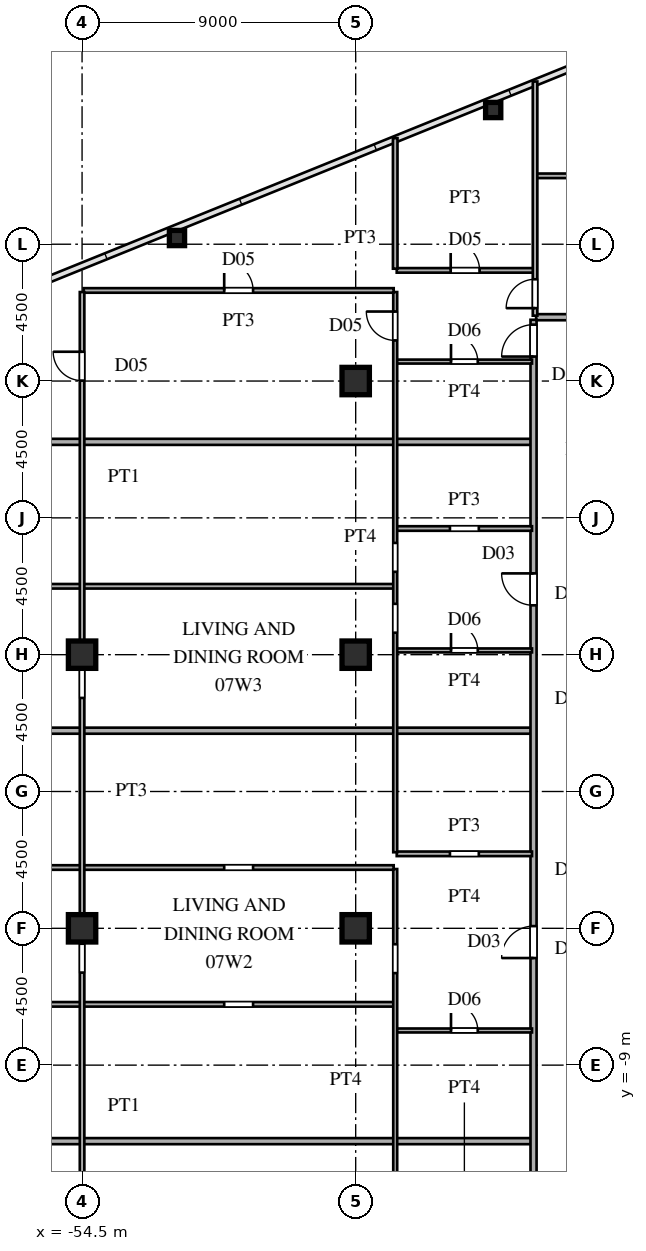
"""IFC4 building model, lengths in metres.
Left out: names, types, materials, properties, quantities, classifications, styles, units other than length and angle.
Written with IfcOpenShell. Run it as: python <this file> out.ifc"""

import sys

from ifc_helpers import new_model, si_unit, direction, frame, frame_2d, origin, origin_2d, place, context, subcontext, project, spatial, rectangle, hollow_rectangle, i_section, extrude, source, transform, mapped, element, fill, save


model = new_model("IFC4")
c1 = context("Model", 3, precision=1e-05, world=origin(), true_north=direction((0.0, 1.0)))
c2 = subcontext(c1, "Body", "Model", "MODEL_VIEW")
j1 = project(units=[si_unit("LENGTHUNIT", "METRE"), si_unit("PLANEANGLEUNIT", "RADIAN")], contexts=[c1])
p1 = place(None, origin())
s1 = spatial("IfcSite", under=j1, at=p1, CompositionType="ELEMENT")
p2 = place(p1, origin())
s2 = spatial("IfcBuilding", under=s1, at=p2, CompositionType="ELEMENT")
p3 = place(p2, frame((0.0, 0.0, 29.7)))
s3 = spatial("IfcBuildingStorey", under=s2, at=p3, CompositionType="ELEMENT", Elevation=29.7)
m1 = source(origin(), c2, "Body", "SweptSolid", [
    extrude(i_section(OverallWidth=0.9, OverallDepth=0.9, WebThickness=0.036, FlangeThickness=0.055, at=origin_2d()), origin(), (0.0, 0.0, 1.0), 3.6),
])
for number, where, z_axis, x_axis in (
    (1, (-45.5, -4.5, 0.0), (0.0, 0.0, 1.0), (1.0, 0.0, 0.0)),
    (2, (-45.5, 4.5, 0.0), (0.0, 0.0, 1.0), (1.0, 0.0, 0.0)),
    (3, (-45.5, 13.5, 0.0), (0.0, 0.0, 1.0), (1.0, 0.0, 0.0)),
    (4, (-54.5, -4.5, 0.0), (0.0, 0.0, 1.0), (1.0, 0.0, 0.0)),
    (5, (-54.5, 4.5, 0.0), (0.0, 0.0, 1.0), (1.0, 0.0, 0.0)),
):
    element("IfcColumn", number, at=place(p3, frame(where, z_axis=z_axis, x_axis=x_axis)), inside=s3, PredefinedType="COLUMN", context=c2, shape_type="MappedRepresentation", body=[
        mapped(m1, transform((0.0, 0.0, 0.0), scale=1.0)),
    ])
m2 = source(origin(), c2, "Body", "SweptSolid", [
    extrude(hollow_rectangle(XDim=0.5, YDim=0.5, WallThickness=0.02, at=origin_2d()), origin(), (0.0, 0.0, 1.0), 3.6),
])
for number, where, z_axis, x_axis in (
    (6, (-40.977, 22.414, 0.0), (0.0, 0.0, 1.0), (1.0, 0.0, 0.0)),
    (7, (-51.378, 18.204, 0.0), (0.0, 0.0, 1.0), (1.0, 0.0, 0.0)),
):
    element("IfcColumn", number, at=place(p3, frame(where, z_axis=z_axis, x_axis=x_axis)), inside=s3, PredefinedType="COLUMN", context=c2, shape_type="MappedRepresentation", body=[
        mapped(m2, transform((0.0, 0.0, 0.0), scale=1.0)),
    ])
p4 = place(p3, frame((-68.807, -11.5, 0.0), z_axis=(0.0, 0.0, 1.0), x_axis=(1.0, 0.0, 0.0)))
e8 = element("IfcWall", 8, at=p4, inside=s3, PredefinedType="PARTITIONING", context=c2, shape_type="SweptSolid", body=[
    extrude(rectangle(XDim=29.077, YDim=0.2, at=frame_2d((14.539, 0.0))), origin(), (0.0, 0.0, 1.0), 3.38),
])
p5 = place(p3, frame((-44.15, -7.86, 0.0), z_axis=(0.0, 0.0, 1.0), x_axis=(1.0, 0.0, 0.0)))
e9 = element("IfcWall", 9, at=p5, inside=s3, PredefinedType="PARTITIONING", context=c2, shape_type="SweptSolid", body=[
    extrude(rectangle(XDim=4.45, YDim=0.13, at=frame_2d((2.225, 0.0))), origin(), (0.0, 0.0, 1.0), 3.38),
])
p6 = place(p5, frame((1.785, 0.0, 0.0)))
e10 = element("IfcOpeningElement", 10, at=p6, cuts=e9, PredefinedType="OPENING", context=c2, shape_type="SweptSolid", body=[
    extrude(rectangle(XDim=0.88, YDim=2.1, at=frame_2d((0.44, 1.05))), frame((0.0, 0.075, 0.0), z_axis=(0.0, -1.0, 0.0), x_axis=(1.0, 0.0, 0.0)), (0.0, 0.0, 1.0), 0.15),
])
p7 = place(p3, frame((-72.535, -7.0, 0.0), z_axis=(0.0, 0.0, 1.0), x_axis=(1.0, 0.0, 0.0)))
e11 = element("IfcWall", 11, at=p7, inside=s3, PredefinedType="PARTITIONING", context=c2, shape_type="SweptSolid", body=[
    extrude(rectangle(XDim=28.285, YDim=0.15, at=frame_2d((14.143, 0.0))), origin(), (0.0, 0.0, 1.0), 3.38),
])
p8 = place(p7, frame((22.71, 0.0, 0.0)))
e12 = element("IfcOpeningElement", 12, at=p8, cuts=e11, PredefinedType="OPENING", context=c2, shape_type="SweptSolid", body=[
    extrude(rectangle(XDim=0.95, YDim=2.15, at=frame_2d((0.475, 1.075))), frame((0.0, 0.085, 0.0), z_axis=(0.0, -1.0, 0.0), x_axis=(1.0, 0.0, 0.0)), (0.0, 0.0, 1.0), 0.17),
])
p9 = place(p7, frame((14.71, 0.0, 0.0)))
e13 = element("IfcOpeningElement", 13, at=p9, cuts=e11, PredefinedType="OPENING", context=c2, shape_type="SweptSolid", body=[
    extrude(rectangle(XDim=0.95, YDim=2.15, at=frame_2d((0.475, 1.075))), frame((0.0, 0.085, 0.0), z_axis=(0.0, -1.0, 0.0), x_axis=(1.0, 0.0, 0.0)), (0.0, 0.0, 1.0), 0.17),
])
p10 = place(p3, frame((-72.535, -2.5, 0.0), z_axis=(0.0, 0.0, 1.0), x_axis=(1.0, 0.0, 0.0)))
e14 = element("IfcWall", 14, at=p10, inside=s3, PredefinedType="PARTITIONING", context=c2, shape_type="SweptSolid", body=[
    extrude(rectangle(XDim=28.285, YDim=0.15, at=frame_2d((14.143, 0.0))), origin(), (0.0, 0.0, 1.0), 3.38),
])
p11 = place(p10, frame((22.71, 0.0, 0.0)))
e15 = element("IfcOpeningElement", 15, at=p11, cuts=e14, PredefinedType="OPENING", context=c2, shape_type="SweptSolid", body=[
    extrude(rectangle(XDim=0.95, YDim=2.15, at=frame_2d((0.475, 1.075))), frame((0.0, 0.085, 0.0), z_axis=(0.0, -1.0, 0.0), x_axis=(1.0, 0.0, 0.0)), (0.0, 0.0, 1.0), 0.17),
])
p12 = place(p10, frame((14.71, 0.0, 0.0)))
e16 = element("IfcOpeningElement", 16, at=p12, cuts=e14, PredefinedType="OPENING", context=c2, shape_type="SweptSolid", body=[
    extrude(rectangle(XDim=0.95, YDim=2.15, at=frame_2d((0.475, 1.075))), frame((0.0, 0.085, 0.0), z_axis=(0.0, -1.0, 0.0), x_axis=(1.0, 0.0, 0.0)), (0.0, 0.0, 1.0), 0.17),
])
p13 = place(p3, frame((-44.15, -2.05, 0.0), z_axis=(0.0, 0.0, 1.0), x_axis=(1.0, 0.0, 0.0)))
e17 = element("IfcWall", 17, at=p13, inside=s3, PredefinedType="PARTITIONING", context=c2, shape_type="SweptSolid", body=[
    extrude(rectangle(XDim=4.45, YDim=0.15, at=frame_2d((2.225, 0.0))), origin(), (0.0, 0.0, 1.0), 3.38),
])
p14 = place(p13, frame((1.75, 0.0, 0.0)))
e18 = element("IfcOpeningElement", 18, at=p14, cuts=e17, PredefinedType="OPENING", context=c2, shape_type="SweptSolid", body=[
    extrude(rectangle(XDim=0.95, YDim=2.15, at=frame_2d((0.475, 1.075))), frame((0.0, 0.085, 0.0), z_axis=(0.0, -1.0, 0.0), x_axis=(1.0, 0.0, 0.0)), (0.0, 0.0, 1.0), 0.17),
])
p15 = place(p3, frame((-72.505, 2.0, 0.0), z_axis=(0.0, 0.0, 1.0), x_axis=(1.0, 0.0, 0.0)))
e19 = element("IfcWall", 19, at=p15, inside=s3, PredefinedType="PARTITIONING", context=c2, shape_type="SweptSolid", body=[
    extrude(rectangle(XDim=32.775, YDim=0.2, at=frame_2d((16.387, 0.0))), origin(), (0.0, 0.0, 1.0), 3.38),
])
p16 = place(p3, frame((-44.15, 4.64, 0.0), z_axis=(0.0, 0.0, 1.0), x_axis=(1.0, 0.0, 0.0)))
e20 = element("IfcWall", 20, at=p16, inside=s3, PredefinedType="PARTITIONING", context=c2, shape_type="SweptSolid", body=[
    extrude(rectangle(XDim=4.45, YDim=0.13, at=frame_2d((2.225, 0.0))), origin(), (0.0, 0.0, 1.0), 2.68),
])
p17 = place(p16, frame((1.785, 0.0, 0.0)))
e21 = element("IfcOpeningElement", 21, at=p17, cuts=e20, PredefinedType="OPENING", context=c2, shape_type="SweptSolid", body=[
    extrude(rectangle(XDim=0.88, YDim=2.1, at=frame_2d((0.44, 1.05))), frame((0.0, 0.075, 0.0), z_axis=(0.0, -1.0, 0.0), x_axis=(1.0, 0.0, 0.0)), (0.0, 0.0, 1.0), 0.15),
])
p18 = place(p3, frame((-72.535, 6.75, 0.0), z_axis=(0.0, 0.0, 1.0), x_axis=(1.0, 0.0, 0.0)))
e22 = element("IfcWall", 22, at=p18, inside=s3, PredefinedType="PARTITIONING", context=c2, shape_type="SweptSolid", body=[
    extrude(rectangle(XDim=28.285, YDim=0.15, at=frame_2d((14.143, 0.0))), origin(), (0.0, 0.0, 1.0), 3.38),
])
p19 = place(p18, frame((5.71, 0.0, 0.0)))
e23 = element("IfcOpeningElement", 23, at=p19, cuts=e22, PredefinedType="OPENING", context=c2, shape_type="SweptSolid", body=[
    extrude(rectangle(XDim=0.95, YDim=2.15, at=frame_2d((0.475, 1.075))), frame((0.0, 0.085, 0.0), z_axis=(0.0, -1.0, 0.0), x_axis=(1.0, 0.0, 0.0)), (0.0, 0.0, 1.0), 0.17),
])
p20 = place(p18, frame((14.71, 0.0, 0.0)))
e24 = element("IfcOpeningElement", 24, at=p20, cuts=e22, PredefinedType="OPENING", context=c2, shape_type="SweptSolid", body=[
    extrude(rectangle(XDim=0.95, YDim=2.15, at=frame_2d((0.475, 1.075))), frame((0.0, 0.085, 0.0), z_axis=(0.0, -1.0, 0.0), x_axis=(1.0, 0.0, 0.0)), (0.0, 0.0, 1.0), 0.17),
])
p21 = place(p3, frame((-44.15, 8.65, 0.0), z_axis=(0.0, 0.0, 1.0), x_axis=(1.0, 0.0, 0.0)))
e25 = element("IfcWall", 25, at=p21, inside=s3, PredefinedType="PARTITIONING", context=c2, shape_type="SweptSolid", body=[
    extrude(rectangle(XDim=4.45, YDim=0.15, at=frame_2d((2.225, 0.0))), origin(), (0.0, 0.0, 1.0), 3.38),
])
p22 = place(p21, frame((1.75, 0.0, 0.0)))
e26 = element("IfcOpeningElement", 26, at=p22, cuts=e25, PredefinedType="OPENING", context=c2, shape_type="SweptSolid", body=[
    extrude(rectangle(XDim=0.95, YDim=2.15, at=frame_2d((0.475, 1.075))), frame((0.0, 0.085, 0.0), z_axis=(0.0, -1.0, 0.0), x_axis=(1.0, 0.0, 0.0)), (0.0, 0.0, 1.0), 0.17),
])
p23 = place(p3, frame((-68.807, 11.5, 0.0), z_axis=(0.0, 0.0, 1.0), x_axis=(1.0, 0.0, 0.0)))
e27 = element("IfcWall", 27, at=p23, inside=s3, PredefinedType="PARTITIONING", context=c2, shape_type="SweptSolid", body=[
    extrude(rectangle(XDim=29.077, YDim=0.2, at=frame_2d((14.539, 0.0))), origin(), (0.0, 0.0, 1.0), 3.38),
])
p24 = place(p3, frame((-44.15, 14.14, 0.0), z_axis=(0.0, 0.0, 1.0), x_axis=(1.0, 0.0, 0.0)))
e28 = element("IfcWall", 28, at=p24, inside=s3, PredefinedType="PARTITIONING", context=c2, shape_type="SweptSolid", body=[
    extrude(rectangle(XDim=4.45, YDim=0.13, at=frame_2d((2.225, 0.0))), origin(), (0.0, 0.0, 1.0), 3.38),
])
p25 = place(p24, frame((1.785, 0.0, 0.0)))
e29 = element("IfcOpeningElement", 29, at=p25, cuts=e28, PredefinedType="OPENING", context=c2, shape_type="SweptSolid", body=[
    extrude(rectangle(XDim=0.88, YDim=2.1, at=frame_2d((0.44, 1.05))), frame((0.0, 0.075, 0.0), z_axis=(0.0, -1.0, 0.0), x_axis=(1.0, 0.0, 0.0)), (0.0, 0.0, 1.0), 0.15),
])
p26 = place(p3, frame((-39.565, 15.6, 0.0), z_axis=(0.0, 0.0, 1.0), x_axis=(1.0, 0.0, 0.0)))
e30 = element("IfcWall", 30, at=p26, inside=s3, PredefinedType="PARTITIONING", context=c2, shape_type="SweptSolid", body=[
    extrude(rectangle(XDim=2.98, YDim=0.2, at=frame_2d((1.49, 0.0))), origin(), (0.0, 0.0, 1.0), 3.38),
])
p27 = place(p3, frame((-54.45, 16.48, 0.0), z_axis=(0.0, 0.0, 1.0), x_axis=(1.0, 0.0, 0.0)))
e31 = element("IfcWall", 31, at=p27, inside=s3, PredefinedType="PARTITIONING", context=c2, shape_type="SweptSolid", body=[
    extrude(rectangle(XDim=10.2, YDim=0.15, at=frame_2d((5.1, 0.0))), origin(), (0.0, 0.0, 1.0), 3.38),
])
p28 = place(p27, frame((4.625, 0.0, 0.0)))
e32 = element("IfcOpeningElement", 32, at=p28, cuts=e31, PredefinedType="OPENING", context=c2, shape_type="SweptSolid", body=[
    extrude(rectangle(XDim=0.95, YDim=2.15, at=frame_2d((0.475, 1.075))), frame((0.0, 0.085, 0.0), z_axis=(0.0, -1.0, 0.0), x_axis=(1.0, 0.0, 0.0)), (0.0, 0.0, 1.0), 0.17),
])
p29 = place(p3, frame((-44.15, 17.14, 0.0), z_axis=(0.0, 0.0, 1.0), x_axis=(1.0, 0.0, 0.0)))
e33 = element("IfcWall", 33, at=p29, inside=s3, PredefinedType="PARTITIONING", context=c2, shape_type="SweptSolid", body=[
    extrude(rectangle(XDim=4.5, YDim=0.15, at=frame_2d((2.25, 0.0))), origin(), (0.0, 0.0, 1.0), 3.38),
])
p30 = place(p29, frame((1.775, 0.0, 0.0)))
e34 = element("IfcOpeningElement", 34, at=p30, cuts=e33, PredefinedType="OPENING", context=c2, shape_type="SweptSolid", body=[
    extrude(rectangle(XDim=0.95, YDim=2.15, at=frame_2d((0.475, 1.075))), frame((0.0, 0.085, 0.0), z_axis=(0.0, -1.0, 0.0), x_axis=(1.0, 0.0, 0.0)), (0.0, 0.0, 1.0), 0.17),
])
p31 = place(p3, frame((-39.55, 20.25, 0.0), z_axis=(0.0, 0.0, 1.0), x_axis=(1.0, 0.0, 0.0)))
e35 = element("IfcWall", 35, at=p31, inside=s3, PredefinedType="PARTITIONING", context=c2, shape_type="SweptSolid", body=[
    extrude(rectangle(XDim=12.085, YDim=0.15, at=frame_2d((6.042, 0.0))), origin(), (0.0, 0.0, 1.0), 3.38),
])
p32 = place(p31, frame((5.525, 0.0, 0.0)))
e36 = element("IfcOpeningElement", 36, at=p32, cuts=e35, PredefinedType="OPENING", context=c2, shape_type="SweptSolid", body=[
    extrude(rectangle(XDim=0.95, YDim=2.15, at=frame_2d((0.475, 1.075))), frame((0.0, 0.085, 0.0), z_axis=(0.0, -1.0, 0.0), x_axis=(1.0, 0.0, 0.0)), (0.0, 0.0, 1.0), 0.17),
])
p33 = place(p3, frame((-54.5, -16.427, 0.0), z_axis=(0.0, 0.0, 1.0), x_axis=(0.0, 1.0, 0.0)))
e37 = element("IfcWall", 37, at=p33, inside=s3, PredefinedType="PARTITIONING", context=c2, shape_type="SweptSolid", body=[
    extrude(rectangle(XDim=32.854, YDim=0.15, at=frame_2d((16.427, 0.0))), origin(), (0.0, 0.0, 1.0), 2.68),
])
p34 = place(p33, frame((1.963, 0.0, 0.0)))
e38 = element("IfcOpeningElement", 38, at=p34, cuts=e37, PredefinedType="OPENING", context=c2, shape_type="SweptSolid", body=[
    extrude(rectangle(XDim=0.95, YDim=2.15, at=frame_2d((0.475, 1.075))), frame((0.0, 0.085, 0.0), z_axis=(0.0, -1.0, 0.0), x_axis=(1.0, 0.0, 0.0)), (0.0, 0.0, 1.0), 0.17),
])
p35 = place(p33, frame((10.47, 0.0, 0.0)))
e39 = element("IfcOpeningElement", 39, at=p35, cuts=e37, PredefinedType="OPENING", context=c2, shape_type="SweptSolid", body=[
    extrude(rectangle(XDim=0.95, YDim=2.15, at=frame_2d((0.475, 1.075))), frame((0.0, 0.085, 0.0), z_axis=(0.0, -1.0, 0.0), x_axis=(1.0, 0.0, 0.0)), (0.0, 0.0, 1.0), 0.17),
])
p36 = place(p33, frame((19.504, 0.0, 0.0)))
e40 = element("IfcOpeningElement", 40, at=p36, cuts=e37, PredefinedType="OPENING", context=c2, shape_type="SweptSolid", body=[
    extrude(rectangle(XDim=0.95, YDim=2.15, at=frame_2d((0.475, 1.075))), frame((0.0, 0.085, 0.0), z_axis=(0.0, -1.0, 0.0), x_axis=(1.0, 0.0, 0.0)), (0.0, 0.0, 1.0), 0.17),
])
p37 = place(p33, frame((29.941, 0.0, 0.0)))
e41 = element("IfcOpeningElement", 41, at=p37, cuts=e37, PredefinedType="OPENING", context=c2, shape_type="SweptSolid", body=[
    extrude(rectangle(XDim=0.95, YDim=2.15, at=frame_2d((0.475, 1.075))), frame((0.0, 0.085, 0.0), z_axis=(0.0, -1.0, 0.0), x_axis=(1.0, 0.0, 0.0)), (0.0, 0.0, 1.0), 0.17),
])
p38 = place(p3, frame((-44.2, -16.427, 0.0), z_axis=(0.0, 0.0, 1.0), x_axis=(0.0, 1.0, 0.0)))
e42 = element("IfcWall", 42, at=p38, inside=s3, PredefinedType="PARTITIONING", context=c2, shape_type="SweptSolid", body=[
    extrude(rectangle(XDim=13.877, YDim=0.13, at=frame_2d((6.938, 0.0))), origin(), (0.0, 0.0, 1.0), 3.38),
])
p39 = place(p38, frame((0.641, 0.0, 0.0)))
e43 = element("IfcOpeningElement", 43, at=p39, cuts=e42, PredefinedType="OPENING", context=c2, shape_type="SweptSolid", body=[
    extrude(rectangle(XDim=0.95, YDim=2.15, at=frame_2d((0.475, 1.075))), frame((0.0, 0.075, 0.0), z_axis=(0.0, -1.0, 0.0), x_axis=(1.0, 0.0, 0.0)), (0.0, 0.0, 1.0), 0.15),
])
p40 = place(p38, frame((10.454, 0.0, 0.0)))
e44 = element("IfcOpeningElement", 44, at=p40, cuts=e42, PredefinedType="OPENING", context=c2, shape_type="SweptSolid", body=[
    extrude(rectangle(XDim=0.95, YDim=2.15, at=frame_2d((0.475, 1.075))), frame((0.0, 0.075, 0.0), z_axis=(0.0, -1.0, 0.0), x_axis=(1.0, 0.0, 0.0)), (0.0, 0.0, 1.0), 0.15),
])
p41 = place(p3, frame((-44.2, -1.998, 0.0), z_axis=(0.0, 0.0, 1.0), x_axis=(0.0, 1.0, 0.0)))
e45 = element("IfcWall", 45, at=p41, inside=s3, PredefinedType="PARTITIONING", context=c2, shape_type="SweptSolid", body=[
    extrude(rectangle(XDim=18.425, YDim=0.13, at=frame_2d((9.212, 0.0))), origin(), (0.0, 0.0, 1.0), 3.38),
])
p42 = place(p41, frame((7.22, 0.0, 0.0)))
e46 = element("IfcOpeningElement", 46, at=p42, cuts=e45, PredefinedType="OPENING", context=c2, shape_type="SweptSolid", body=[
    extrude(rectangle(XDim=0.95, YDim=2.15, at=frame_2d((0.475, 1.075))), frame((0.0, 0.075, 0.0), z_axis=(0.0, -1.0, 0.0), x_axis=(1.0, 0.0, 0.0)), (0.0, 0.0, 1.0), 0.15),
])
p43 = place(p41, frame((9.224, 0.0, 0.0)))
e47 = element("IfcOpeningElement", 47, at=p43, cuts=e45, PredefinedType="OPENING", context=c2, shape_type="SweptSolid", body=[
    extrude(rectangle(XDim=0.95, YDim=2.15, at=frame_2d((0.475, 1.075))), frame((0.0, 0.075, 0.0), z_axis=(0.0, -1.0, 0.0), x_axis=(1.0, 0.0, 0.0)), (0.0, 0.0, 1.0), 0.15),
])
p44 = place(p41, frame((16.834, 0.0, 0.0)))
e48 = element("IfcOpeningElement", 48, at=p44, cuts=e45, PredefinedType="OPENING", context=c2, shape_type="SweptSolid", body=[
    extrude(rectangle(XDim=0.95, YDim=2.15, at=frame_2d((0.475, 1.075))), frame((0.0, 0.075, 0.0), z_axis=(0.0, -1.0, 0.0), x_axis=(1.0, 0.0, 0.0)), (0.0, 0.0, 1.0), 0.15),
])
p45 = place(p3, frame((-44.2, 17.195, 0.0), z_axis=(0.0, 0.0, 1.0), x_axis=(0.0, 1.0, 0.0)))
e49 = element("IfcWall", 49, at=p45, inside=s3, PredefinedType="PARTITIONING", context=c2, shape_type="SweptSolid", body=[
    extrude(rectangle(XDim=4.295, YDim=0.15, at=frame_2d((2.147, 0.0))), origin(), (0.0, 0.0, 1.0), 3.38),
])
p46 = place(p3, frame((-39.65, -15.515, 0.0), z_axis=(0.0, 0.0, 1.0), x_axis=(0.0, 1.0, 0.0)))
e50 = element("IfcWall", 50, at=p46, inside=s3, PredefinedType="PARTITIONING", context=c2, shape_type="SweptSolid", body=[
    extrude(rectangle(XDim=31.03, YDim=0.2, at=frame_2d((15.515, 0.0))), origin(), (0.0, 0.0, 1.0), 3.38),
])
p47 = place(p46, frame((0.16, 0.0, 0.0)))
e51 = element("IfcOpeningElement", 51, at=p47, cuts=e50, PredefinedType="OPENING", context=c2, shape_type="SweptSolid", body=[
    extrude(rectangle(XDim=1.05, YDim=2.25, at=frame_2d((0.525, 1.125))), frame((0.0, 0.11, 0.0), z_axis=(0.0, -1.0, 0.0), x_axis=(1.0, 0.0, 0.0)), (0.0, 0.0, 1.0), 0.22),
])
p48 = place(p46, frame((10.038, 0.0, 0.0)))
e52 = element("IfcOpeningElement", 52, at=p48, cuts=e50, PredefinedType="OPENING", context=c2, shape_type="SweptSolid", body=[
    extrude(rectangle(XDim=1.05, YDim=2.25, at=frame_2d((0.525, 1.125))), frame((0.0, 0.11, 0.0), z_axis=(0.0, -1.0, 0.0), x_axis=(1.0, 0.0, 0.0)), (0.0, 0.0, 1.0), 0.22),
])
p49 = place(p46, frame((21.638, 0.0, 0.0)))
e53 = element("IfcOpeningElement", 53, at=p49, cuts=e50, PredefinedType="OPENING", context=c2, shape_type="SweptSolid", body=[
    extrude(rectangle(XDim=1.05, YDim=2.25, at=frame_2d((0.525, 1.125))), frame((0.0, 0.11, 0.0), z_axis=(0.0, -1.0, 0.0), x_axis=(1.0, 0.0, 0.0)), (0.0, 0.0, 1.0), 0.22),
])
p50 = place(p46, frame((29.82, 0.0, 0.0)))
e54 = element("IfcOpeningElement", 54, at=p50, cuts=e50, PredefinedType="OPENING", context=c2, shape_type="SweptSolid", body=[
    extrude(rectangle(XDim=1.05, YDim=2.25, at=frame_2d((0.525, 1.125))), frame((0.0, 0.11, 0.0), z_axis=(0.0, -1.0, 0.0), x_axis=(1.0, 0.0, 0.0)), (0.0, 0.0, 1.0), 0.22),
])
p51 = place(p3, frame((-39.6, 15.65, 0.0), z_axis=(0.0, 0.0, 1.0), x_axis=(0.0, 1.0, 0.0)))
e55 = element("IfcWall", 55, at=p51, inside=s3, PredefinedType="PARTITIONING", context=c2, shape_type="SweptSolid", body=[
    extrude(rectangle(XDim=7.702, YDim=0.15, at=frame_2d((3.851, 0.0))), origin(), (0.0, 0.0, 1.0), 3.38),
])
p52 = place(p51, frame((0.248, 0.0, 0.0)))
e56 = element("IfcOpeningElement", 56, at=p52, cuts=e55, PredefinedType="OPENING", context=c2, shape_type="SweptSolid", body=[
    extrude(rectangle(XDim=0.95, YDim=2.15, at=frame_2d((0.475, 1.075))), frame((0.0, 0.085, 0.0), z_axis=(0.0, -1.0, 0.0), x_axis=(1.0, 0.0, 0.0)), (0.0, 0.0, 1.0), 0.17),
])
m3 = source(origin(), c2, "Body", "SweptSolid", [
    extrude(rectangle(XDim=0.88, YDim=2.1, at=frame_2d((0.44, 1.05))), frame((0.0, 0.025, 0.0), z_axis=(0.0, -1.0, 0.0), x_axis=(1.0, 0.0, 0.0)), (0.0, 0.0, 1.0), 0.05),
])
p53 = place(p6, origin())
e57 = element("IfcDoor", 57, at=p53, inside=s3, OperationType="SINGLE_SWING_LEFT", PredefinedType="DOOR", context=c2, shape_type="MappedRepresentation", body=[
    mapped(m3, transform((0.0, 0.0, 0.0), scale=1.0)),
])
fill(e10, e57)
p54 = place(p17, origin())
e58 = element("IfcDoor", 58, at=p54, inside=s3, OperationType="SINGLE_SWING_LEFT", PredefinedType="DOOR", context=c2, shape_type="MappedRepresentation", body=[
    mapped(m3, transform((0.0, 0.0, 0.0), scale=1.0)),
])
fill(e21, e58)
p55 = place(p25, origin())
e59 = element("IfcDoor", 59, at=p55, inside=s3, OperationType="SINGLE_SWING_LEFT", PredefinedType="DOOR", context=c2, shape_type="MappedRepresentation", body=[
    mapped(m3, transform((0.0, 0.0, 0.0), scale=1.0)),
])
fill(e29, e59)
m4 = source(origin(), c2, "Body", "SweptSolid", [
    extrude(rectangle(XDim=0.95, YDim=2.15, at=frame_2d((0.475, 1.075))), frame((0.0, 0.025, 0.0), z_axis=(0.0, -1.0, 0.0), x_axis=(1.0, 0.0, 0.0)), (0.0, 0.0, 1.0), 0.05),
])
p56 = place(p28, origin())
e60 = element("IfcDoor", 60, at=p56, inside=s3, OperationType="SINGLE_SWING_LEFT", PredefinedType="DOOR", context=c2, shape_type="MappedRepresentation", body=[
    mapped(m4, transform((0.0, 0.0, 0.0), scale=1.0)),
])
fill(e32, e60)
p57 = place(p30, origin())
e61 = element("IfcDoor", 61, at=p57, inside=s3, OperationType="SINGLE_SWING_LEFT", PredefinedType="DOOR", context=c2, shape_type="MappedRepresentation", body=[
    mapped(m4, transform((0.0, 0.0, 0.0), scale=1.0)),
])
fill(e34, e61)
p58 = place(p37, origin())
e62 = element("IfcDoor", 62, at=p58, inside=s3, OperationType="SINGLE_SWING_RIGHT", PredefinedType="DOOR", context=c2, shape_type="MappedRepresentation", body=[
    mapped(m4, transform((0.0, 0.0, 0.0), scale=1.0)),
])
fill(e41, e62)
p59 = place(p44, origin())
e63 = element("IfcDoor", 63, at=p59, inside=s3, OperationType="SINGLE_SWING_RIGHT", PredefinedType="DOOR", context=c2, shape_type="MappedRepresentation", body=[
    mapped(m4, transform((0.0, 0.0, 0.0), scale=1.0)),
])
fill(e48, e63)
m5 = source(origin(), c2, "Body", "SweptSolid", [
    extrude(rectangle(XDim=1.05, YDim=2.25, at=frame_2d((0.525, 1.125))), frame((0.0, 0.025, 0.0), z_axis=(0.0, -1.0, 0.0), x_axis=(1.0, 0.0, 0.0)), (0.0, 0.0, 1.0), 0.05),
])
p60 = place(p48, origin())
e64 = element("IfcDoor", 64, at=p60, inside=s3, OperationType="SINGLE_SWING_LEFT", PredefinedType="DOOR", context=c2, shape_type="MappedRepresentation", body=[
    mapped(m5, transform((0.0, 0.0, 0.0), scale=1.0)),
])
fill(e52, e64)
p61 = place(p49, origin())
e65 = element("IfcDoor", 65, at=p61, inside=s3, OperationType="SINGLE_SWING_RIGHT", PredefinedType="DOOR", context=c2, shape_type="MappedRepresentation", body=[
    mapped(m5, transform((0.0, 0.0, 0.0), scale=1.0)),
])
fill(e53, e65)
p62 = place(p50, origin())
e66 = element("IfcDoor", 66, at=p62, inside=s3, OperationType="SINGLE_SWING_LEFT", PredefinedType="DOOR", context=c2, shape_type="MappedRepresentation", body=[
    mapped(m5, transform((0.0, 0.0, 0.0), scale=1.0)),
])
fill(e54, e66)
p63 = place(p52, origin())
e67 = element("IfcDoor", 67, at=p63, inside=s3, OperationType="SINGLE_SWING_LEFT", PredefinedType="DOOR", context=c2, shape_type="MappedRepresentation", body=[
    mapped(m4, transform((0.0, 0.0, 0.0), scale=1.0)),
])
fill(e56, e67)
save(model, sys.argv[1])
